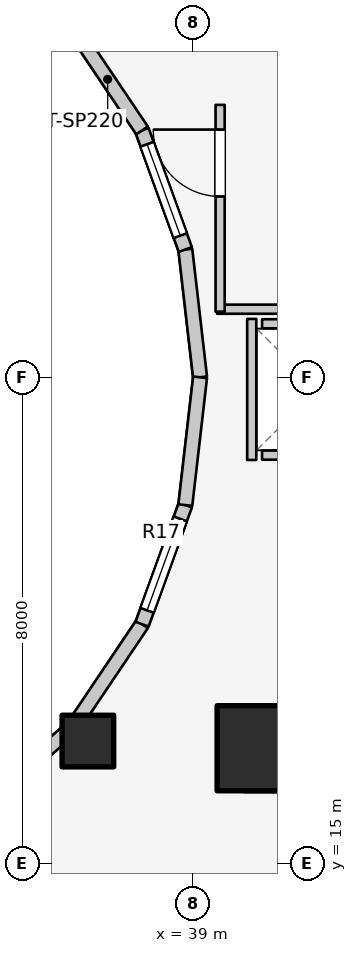
"""IFC4 building model, lengths in metres.
Left out: names, types, materials, properties, quantities, classifications, styles, units other than length and angle.
Written with IfcOpenShell. Run it as: python <this file> out.ifc"""

import sys

from ifc_helpers import new_model, si_unit, direction, frame, frame_2d, origin, origin_2d, place, context, subcontext, project, spatial, rectangle, extrude, element, fill, save


model = new_model("IFC4")
c1 = context("Model", 3, precision=1e-05, world=origin(), true_north=direction((0.0, 1.0)))
c2 = subcontext(c1, "Body", "Model", "MODEL_VIEW")
j1 = project(units=[si_unit("LENGTHUNIT", "METRE"), si_unit("PLANEANGLEUNIT", "RADIAN")], contexts=[c1])
p1 = place(None, origin())
s1 = spatial("IfcSite", under=j1, at=p1, CompositionType="ELEMENT")
p2 = place(p1, origin())
s2 = spatial("IfcBuilding", under=s1, at=p2, CompositionType="ELEMENT")
p3 = place(p2, frame((0.0, 0.0, 122.8)))
s3 = spatial("IfcBuildingStorey", under=s2, at=p3, CompositionType="ELEMENT", Elevation=122.8)
p4 = place(p3, frame((39.85, 16.55, 0.0), z_axis=(0.0, 0.0, 1.0), x_axis=(1.0, 0.0, 0.0)))
e1 = element("IfcWall", 1, at=p4, inside=s3, PredefinedType="SHEAR", context=c2, shape_type="SweptSolid", body=[
    extrude(rectangle(XDim=4.5, YDim=0.7, at=frame_2d((2.25, 0.0))), origin(), (0.0, 0.0, 1.0), 3.1),
])
p5 = place(p3, frame((40.1, 16.9, 0.0), z_axis=(0.0, 0.0, 1.0), x_axis=(1.0, 0.0, 0.0)))
e2 = element("IfcColumn", 2, at=p5, inside=s3, PredefinedType="COLUMN", context=c2, shape_type="SweptSolid", body=[
    extrude(rectangle(XDim=1.4, YDim=1.4, at=origin_2d()), origin(), (0.0, 0.0, 1.0), 3.1),
])
p6 = place(p3, frame((37.275, 17.018, 0.0), z_axis=(0.0, 0.0, 1.0), x_axis=(1.0, 0.0, 0.0)))
e3 = element("IfcColumn", 3, at=p6, inside=s3, PredefinedType="COLUMN", context=c2, shape_type="SweptSolid", body=[
    extrude(rectangle(XDim=0.85, YDim=0.85, at=origin_2d()), origin(), (0.0, 0.0, 1.0), 3.1),
])
p7 = place(p3, frame((39.12, 23.0, 0.0), z_axis=(0.0, 0.0, 1.0), x_axis=(-0.114711713601, 0.993398823617, 0.0)))
e4 = element("IfcWall", 4, at=p7, inside=s3, PredefinedType="STANDARD", context=c2, shape_type="SweptSolid", body=[
    extrude(rectangle(XDim=2.115, YDim=0.23, at=frame_2d((1.058, 0.0))), origin(), (0.0, 0.0, 1.0), 2.84),
])
p8 = place(p3, frame((38.877, 25.102, 0.0), z_axis=(0.0, 0.0, 1.0), x_axis=(-0.341423187295, 0.93990968033, 0.0)))
e5 = element("IfcWall", 5, at=p8, inside=s3, PredefinedType="STANDARD", context=c2, shape_type="SweptSolid", body=[
    extrude(rectangle(XDim=2.084, YDim=0.23, at=frame_2d((1.042, 0.0))), origin(), (0.0, 0.0, 1.0), 2.84),
])
p9 = place(p8, frame((0.242, 0.0, 0.85)))
e6 = element("IfcOpeningElement", 6, at=p9, cuts=e5, PredefinedType="OPENING", context=c2, shape_type="SweptSolid", body=[
    extrude(rectangle(XDim=1.6, YDim=1.65, at=frame_2d((0.8, 0.825))), frame((0.0, 0.125, 0.0), z_axis=(0.0, -1.0, 0.0), x_axis=(1.0, 0.0, 0.0)), (0.0, 0.0, 1.0), 0.25),
])
p10 = place(p3, frame((38.166, 27.06, 0.0), z_axis=(0.0, 0.0, 1.0), x_axis=(-0.558197800898, 0.829707909492, 0.0)))
e7 = element("IfcWall", 7, at=p10, inside=s3, PredefinedType="STANDARD", context=c2, shape_type="SweptSolid", body=[
    extrude(rectangle(XDim=2.027, YDim=0.23, at=frame_2d((1.013, 0.0))), origin(), (0.0, 0.0, 1.0), 2.16),
])
p11 = place(p3, frame((35.56, 15.968, 0.0), z_axis=(0.0, 0.0, 1.0), x_axis=(0.752576694707, 0.658504607869, 0.0)))
e8 = element("IfcWall", 8, at=p11, inside=s3, PredefinedType="STANDARD", context=c2, shape_type="SweptSolid", body=[
    extrude(rectangle(XDim=1.959, YDim=0.23, at=frame_2d((0.98, 0.0))), origin(), (0.0, 0.0, 1.0), 2.16),
])
p12 = place(p3, frame((37.035, 17.258, 0.0), z_axis=(0.0, 0.0, 1.0), x_axis=(0.558197800898, 0.829707909492, 0.0)))
e9 = element("IfcWall", 9, at=p12, inside=s3, PredefinedType="STANDARD", context=c2, shape_type="SweptSolid", body=[
    extrude(rectangle(XDim=2.027, YDim=0.23, at=frame_2d((1.013, 0.0))), origin(), (0.0, 0.0, 1.0), 2.16),
])
p13 = place(p3, frame((38.166, 18.94, 0.0), z_axis=(0.0, 0.0, 1.0), x_axis=(0.341423187295, 0.93990968033, 0.0)))
e10 = element("IfcWall", 10, at=p13, inside=s3, PredefinedType="STANDARD", context=c2, shape_type="SweptSolid", body=[
    extrude(rectangle(XDim=2.084, YDim=0.23, at=frame_2d((1.042, 0.0))), origin(), (0.0, 0.0, 1.0), 2.84),
])
p14 = place(p13, frame((0.242, 0.0, 0.85)))
e11 = element("IfcOpeningElement", 11, at=p14, cuts=e10, PredefinedType="OPENING", context=c2, shape_type="SweptSolid", body=[
    extrude(rectangle(XDim=1.6, YDim=1.65, at=frame_2d((0.8, 0.825))), frame((0.0, 0.125, 0.0), z_axis=(0.0, -1.0, 0.0), x_axis=(1.0, 0.0, 0.0)), (0.0, 0.0, 1.0), 0.25),
])
p15 = place(p3, frame((38.877, 20.898, 0.0), z_axis=(0.0, 0.0, 1.0), x_axis=(0.114711713601, 0.993398823617, 0.0)))
e12 = element("IfcWall", 12, at=p15, inside=s3, PredefinedType="STANDARD", context=c2, shape_type="SweptSolid", body=[
    extrude(rectangle(XDim=2.115, YDim=0.23, at=frame_2d((1.058, 0.0))), origin(), (0.0, 0.0, 1.0), 2.84),
])
for number, where, z_axis, x_axis in (
    (13, (40.14, 21.72, 0.0), (0.0, 0.0, 1.0), (1.0, 0.0, 0.0)),
    (14, (40.14, 23.88, 0.0), (0.0, 0.0, 1.0), (1.0, 0.0, 0.0)),
):
    element("IfcWall", number, at=place(p3, frame(where, z_axis=z_axis, x_axis=x_axis)), inside=s3, PredefinedType="SOLIDWALL", context=c2, shape_type="SweptSolid", body=[
        extrude(rectangle(XDim=1.82, YDim=0.15, at=frame_2d((0.91, 0.0))), origin(), (0.0, 0.0, 1.0), 2.12),
    ])
p16 = place(p3, frame((39.97, 21.64, 0.0), z_axis=(0.0, 0.0, 1.0), x_axis=(0.0, 1.0, 0.0)))
e15 = element("IfcWall", 15, at=p16, inside=s3, PredefinedType="SOLIDWALL", context=c2, shape_type="SweptSolid", body=[
    extrude(rectangle(XDim=2.32, YDim=0.15, at=frame_2d((1.16, 0.0))), origin(), (0.0, 0.0, 1.0), 2.12),
])
p17 = place(p3, frame((39.4, 24.12, 0.0), z_axis=(0.0, 0.0, 1.0), x_axis=(1.0, 0.0, 0.0)))
e16 = element("IfcWall", 16, at=p17, inside=s3, PredefinedType="PARTITIONING", context=c2, shape_type="SweptSolid", body=[
    extrude(rectangle(XDim=5.08, YDim=0.15, at=frame_2d((2.54, 0.0))), origin(), (0.0, 0.0, 1.0), 2.12),
])
p18 = place(p3, frame((39.45, 24.08, 0.0), z_axis=(0.0, 0.0, 1.0), x_axis=(0.0, 1.0, 0.0)))
e17 = element("IfcWall", 17, at=p18, inside=s3, PredefinedType="PARTITIONING", context=c2, shape_type="SweptSolid", body=[
    extrude(rectangle(XDim=3.4, YDim=0.15, at=frame_2d((1.7, 0.0))), origin(), (0.0, 0.0, 1.0), 2.855),
])
p19 = place(p18, frame((1.894, 0.0, 0.0)))
e18 = element("IfcOpeningElement", 18, at=p19, cuts=e17, PredefinedType="OPENING", context=c2, shape_type="SweptSolid", body=[
    extrude(rectangle(XDim=1.1, YDim=2.1, at=frame_2d((0.55, 1.05))), frame((0.0, 0.085, 0.0), z_axis=(0.0, -1.0, 0.0), x_axis=(1.0, 0.0, 0.0)), (0.0, 0.0, 1.0), 0.17),
])
p20 = place(p3, frame((35.55, 15.985, 0.0), z_axis=(0.0, 0.0, 1.0), x_axis=(0.523587550846, -0.851971875474, 0.0)))
e19 = element("IfcWall", 19, at=p20, inside=s3, PredefinedType="PARTITIONING", context=c2, shape_type="SweptSolid", body=[
    extrude(rectangle(XDim=3.153, YDim=0.125, at=frame_2d((1.577, 0.0))), origin(), (0.0, 0.0, 1.0), 2.272),
])
p21 = place(p9, origin())
e20 = element("IfcWindow", 20, at=p21, inside=s3, PartitioningType="SINGLE_PANEL", PredefinedType="WINDOW", context=c2, shape_type="SweptSolid", body=[
    extrude(rectangle(XDim=1.6, YDim=1.65, at=frame_2d((0.8, 0.825))), frame((0.0, 0.03, 0.0), z_axis=(0.0, -1.0, 0.0), x_axis=(1.0, 0.0, 0.0)), (0.0, 0.0, 1.0), 0.06),
])
fill(e6, e20)
p22 = place(p14, origin())
e21 = element("IfcWindow", 21, at=p22, inside=s3, PartitioningType="SINGLE_PANEL", PredefinedType="WINDOW", context=c2, shape_type="SweptSolid", body=[
    extrude(rectangle(XDim=1.6, YDim=1.65, at=frame_2d((0.8, 0.825))), frame((0.0, 0.03, 0.0), z_axis=(0.0, -1.0, 0.0), x_axis=(1.0, 0.0, 0.0)), (0.0, 0.0, 1.0), 0.06),
])
fill(e11, e21)
p23 = place(p19, origin())
e22 = element("IfcDoor", 22, at=p23, inside=s3, OperationType="SINGLE_SWING_RIGHT", PredefinedType="DOOR", context=c2, shape_type="SweptSolid", body=[
    extrude(rectangle(XDim=1.1, YDim=2.1, at=frame_2d((0.55, 1.05))), frame((0.0, 0.025, 0.0), z_axis=(0.0, -1.0, 0.0), x_axis=(1.0, 0.0, 0.0)), (0.0, 0.0, 1.0), 0.05),
])
fill(e18, e22)
save(model, sys.argv[1])
